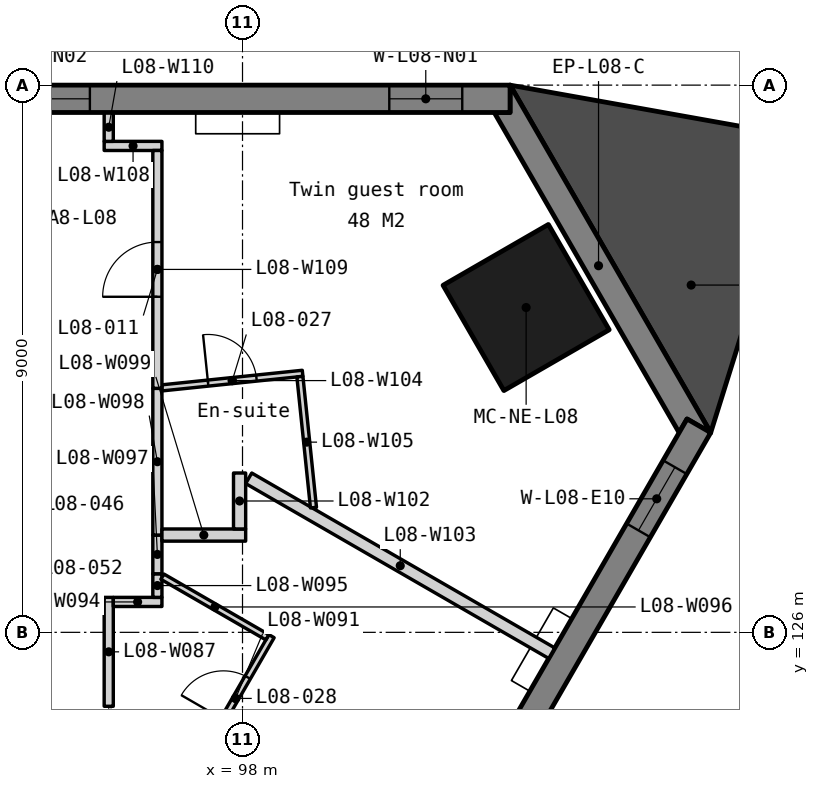
"""IFC4 building model, lengths in metres.
Left out: names, types, materials, properties, quantities, classifications, styles, units other than length and angle.
Written with IfcOpenShell. Run it as: python <this file> out.ifc"""

import sys

from ifc_helpers import new_model, si_unit, direction, frame, frame_2d, origin, origin_2d, place, context, subcontext, project, spatial, polyline, rectangle, outline, extrude, element, fill, save


model = new_model("IFC4")
c1 = context("Model", 3, precision=1e-05, world=origin(), true_north=direction((0.0, 1.0)))
c2 = subcontext(c1, "Body", "Model", "MODEL_VIEW")
j1 = project(units=[si_unit("LENGTHUNIT", "METRE"), si_unit("PLANEANGLEUNIT", "RADIAN")], contexts=[c1])
p1 = place(None, origin())
s1 = spatial("IfcSite", under=j1, at=p1, CompositionType="ELEMENT")
p2 = place(p1, origin())
s2 = spatial("IfcBuilding", under=s1, at=p2, CompositionType="ELEMENT")
p3 = place(p2, frame((0.0, 0.0, 42.0)))
s3 = spatial("IfcBuildingStorey", under=s2, at=p3, CompositionType="ELEMENT", Elevation=42.0)
p4 = place(p3, frame((102.664, 131.342, 0.0), z_axis=(0.0, 0.0, 1.0), x_axis=(-0.5, 0.866025403784, 0.0)))
e1 = element("IfcColumn", 1, at=p4, inside=s3, PredefinedType="COLUMN", context=c2, shape_type="SweptSolid", body=[
    extrude(rectangle(XDim=2.0, YDim=2.0, at=origin_2d()), origin(), (0.0, 0.0, 1.0), 3.5),
])
p5 = place(p3, frame((0.0, 0.0, -0.15)))
e2 = element("IfcWall", 2, at=p5, inside=s3, PredefinedType="SOLIDWALL", context=c2, shape_type="SweptSolid", body=[
    extrude(outline(polyline([(105.7, 129.284), (105.31, 129.509), (105.18, 129.284), (102.14, 134.55), (102.4, 134.55), (102.4, 135.0), (105.7, 129.284)])), origin(), (0.0, 0.0, 1.0), 3.5),
])
p6 = place(p3, frame((102.4, 134.775, -0.15), z_axis=(0.0, 0.0, 1.0), x_axis=(-1.0, 0.0, 0.0)))
e3 = element("IfcWall", 3, at=p6, inside=s3, PredefinedType="SOLIDWALL", context=c2, shape_type="SweptSolid", body=[
    extrude(outline(polyline([(44.8, 0.0), (44.8, 3.5), (0.0, 3.5), (0.0, 0.0), (44.8, 0.0)])), frame((0.0, 0.225, 0.0), z_axis=(0.0, -1.0, 0.0), x_axis=(1.0, 0.0, 0.0)), (0.0, 0.0, 1.0), 0.45),
])
p7 = place(p6, frame((0.786, 0.0, 1.05)))
e4 = element("IfcOpeningElement", 4, at=p7, cuts=e3, PredefinedType="OPENING", context=c2, shape_type="SweptSolid", body=[
    extrude(rectangle(XDim=1.2, YDim=1.5, at=frame_2d((0.6, 0.75))), frame((0.0, 0.235, 0.0), z_axis=(0.0, -1.0, 0.0), x_axis=(1.0, 0.0, 0.0)), (0.0, 0.0, 1.0), 0.47),
])
p8 = place(p6, frame((6.91, 0.0, 1.05)))
e5 = element("IfcOpeningElement", 5, at=p8, cuts=e3, PredefinedType="OPENING", context=c2, shape_type="SweptSolid", body=[
    extrude(rectangle(XDim=1.8, YDim=1.5, at=frame_2d((0.9, 0.75))), frame((0.0, 0.235, 0.0), z_axis=(0.0, -1.0, 0.0), x_axis=(1.0, 0.0, 0.0)), (0.0, 0.0, 1.0), 0.47),
])
p9 = place(p6, frame((9.21, 0.0, 1.05)))
e6 = element("IfcOpeningElement", 6, at=p9, cuts=e3, PredefinedType="OPENING", context=c2, shape_type="SweptSolid", body=[
    extrude(rectangle(XDim=1.8, YDim=1.5, at=frame_2d((0.9, 0.75))), frame((0.0, 0.235, 0.0), z_axis=(0.0, -1.0, 0.0), x_axis=(1.0, 0.0, 0.0)), (0.0, 0.0, 1.0), 0.47),
])
p10 = place(p6, frame((15.87, 0.0, 1.05)))
e7 = element("IfcOpeningElement", 7, at=p10, cuts=e3, PredefinedType="OPENING", context=c2, shape_type="SweptSolid", body=[
    extrude(rectangle(XDim=1.8, YDim=1.5, at=frame_2d((0.9, 0.75))), frame((0.0, 0.235, 0.0), z_axis=(0.0, -1.0, 0.0), x_axis=(1.0, 0.0, 0.0)), (0.0, 0.0, 1.0), 0.47),
])
p11 = place(p6, frame((18.17, 0.0, 1.05)))
e8 = element("IfcOpeningElement", 8, at=p11, cuts=e3, PredefinedType="OPENING", context=c2, shape_type="SweptSolid", body=[
    extrude(rectangle(XDim=1.8, YDim=1.5, at=frame_2d((0.9, 0.75))), frame((0.0, 0.235, 0.0), z_axis=(0.0, -1.0, 0.0), x_axis=(1.0, 0.0, 0.0)), (0.0, 0.0, 1.0), 0.47),
])
p12 = place(p6, frame((24.83, 0.0, 1.05)))
e9 = element("IfcOpeningElement", 9, at=p12, cuts=e3, PredefinedType="OPENING", context=c2, shape_type="SweptSolid", body=[
    extrude(rectangle(XDim=1.8, YDim=1.5, at=frame_2d((0.9, 0.75))), frame((0.0, 0.235, 0.0), z_axis=(0.0, -1.0, 0.0), x_axis=(1.0, 0.0, 0.0)), (0.0, 0.0, 1.0), 0.47),
])
p13 = place(p6, frame((27.13, 0.0, 1.05)))
e10 = element("IfcOpeningElement", 10, at=p13, cuts=e3, PredefinedType="OPENING", context=c2, shape_type="SweptSolid", body=[
    extrude(rectangle(XDim=1.8, YDim=1.5, at=frame_2d((0.9, 0.75))), frame((0.0, 0.235, 0.0), z_axis=(0.0, -1.0, 0.0), x_axis=(1.0, 0.0, 0.0)), (0.0, 0.0, 1.0), 0.47),
])
p14 = place(p6, frame((33.79, 0.0, 1.05)))
e11 = element("IfcOpeningElement", 11, at=p14, cuts=e3, PredefinedType="OPENING", context=c2, shape_type="SweptSolid", body=[
    extrude(rectangle(XDim=1.8, YDim=1.5, at=frame_2d((0.9, 0.75))), frame((0.0, 0.235, 0.0), z_axis=(0.0, -1.0, 0.0), x_axis=(1.0, 0.0, 0.0)), (0.0, 0.0, 1.0), 0.47),
])
p15 = place(p6, frame((36.09, 0.0, 1.05)))
e12 = element("IfcOpeningElement", 12, at=p15, cuts=e3, PredefinedType="OPENING", context=c2, shape_type="SweptSolid", body=[
    extrude(rectangle(XDim=1.8, YDim=1.5, at=frame_2d((0.9, 0.75))), frame((0.0, 0.235, 0.0), z_axis=(0.0, -1.0, 0.0), x_axis=(1.0, 0.0, 0.0)), (0.0, 0.0, 1.0), 0.47),
])
p16 = place(p6, frame((42.814, 0.0, 1.05)))
e13 = element("IfcOpeningElement", 13, at=p16, cuts=e3, PredefinedType="OPENING", context=c2, shape_type="SweptSolid", body=[
    extrude(rectangle(XDim=1.2, YDim=1.5, at=frame_2d((0.6, 0.75))), frame((0.0, 0.235, 0.0), z_axis=(0.0, -1.0, 0.0), x_axis=(1.0, 0.0, 0.0)), (0.0, 0.0, 1.0), 0.47),
])
p17 = place(p3, frame((83.105, 90.599, -0.15), z_axis=(0.0, 0.0, 1.0), x_axis=(0.499999201451, 0.866025864826, 0.0)))
e14 = element("IfcWall", 14, at=p17, inside=s3, PredefinedType="SOLIDWALL", context=c2, shape_type="SweptSolid", body=[
    extrude(outline(polyline([(44.8, 0.0), (44.8, 3.5), (0.0, 3.5), (0.0, 0.0), (44.8, 0.0)])), frame((0.0, 0.225, 0.0), z_axis=(0.0, -1.0, 0.0), x_axis=(1.0, 0.0, 0.0)), (0.0, 0.0, 1.0), 0.45),
])
p18 = place(p17, frame((0.786, 0.0, 1.05)))
e15 = element("IfcOpeningElement", 15, at=p18, cuts=e14, PredefinedType="OPENING", context=c2, shape_type="SweptSolid", body=[
    extrude(rectangle(XDim=1.2, YDim=1.5, at=frame_2d((0.6, 0.75))), frame((0.0, 0.235, 0.0), z_axis=(0.0, -1.0, 0.0), x_axis=(1.0, 0.0, 0.0)), (0.0, 0.0, 1.0), 0.47),
])
p19 = place(p17, frame((6.91, 0.0, 1.05)))
e16 = element("IfcOpeningElement", 16, at=p19, cuts=e14, PredefinedType="OPENING", context=c2, shape_type="SweptSolid", body=[
    extrude(rectangle(XDim=1.8, YDim=1.5, at=frame_2d((0.9, 0.75))), frame((0.0, 0.235, 0.0), z_axis=(0.0, -1.0, 0.0), x_axis=(1.0, 0.0, 0.0)), (0.0, 0.0, 1.0), 0.47),
])
p20 = place(p17, frame((9.21, 0.0, 1.05)))
e17 = element("IfcOpeningElement", 17, at=p20, cuts=e14, PredefinedType="OPENING", context=c2, shape_type="SweptSolid", body=[
    extrude(rectangle(XDim=1.8, YDim=1.5, at=frame_2d((0.9, 0.75))), frame((0.0, 0.235, 0.0), z_axis=(0.0, -1.0, 0.0), x_axis=(1.0, 0.0, 0.0)), (0.0, 0.0, 1.0), 0.47),
])
p21 = place(p17, frame((15.87, 0.0, 1.05)))
e18 = element("IfcOpeningElement", 18, at=p21, cuts=e14, PredefinedType="OPENING", context=c2, shape_type="SweptSolid", body=[
    extrude(rectangle(XDim=1.8, YDim=1.5, at=frame_2d((0.9, 0.75))), frame((0.0, 0.235, 0.0), z_axis=(0.0, -1.0, 0.0), x_axis=(1.0, 0.0, 0.0)), (0.0, 0.0, 1.0), 0.47),
])
p22 = place(p17, frame((18.17, 0.0, 1.05)))
e19 = element("IfcOpeningElement", 19, at=p22, cuts=e14, PredefinedType="OPENING", context=c2, shape_type="SweptSolid", body=[
    extrude(rectangle(XDim=1.8, YDim=1.5, at=frame_2d((0.9, 0.75))), frame((0.0, 0.235, 0.0), z_axis=(0.0, -1.0, 0.0), x_axis=(1.0, 0.0, 0.0)), (0.0, 0.0, 1.0), 0.47),
])
p23 = place(p17, frame((24.83, 0.0, 1.05)))
e20 = element("IfcOpeningElement", 20, at=p23, cuts=e14, PredefinedType="OPENING", context=c2, shape_type="SweptSolid", body=[
    extrude(rectangle(XDim=1.8, YDim=1.5, at=frame_2d((0.9, 0.75))), frame((0.0, 0.235, 0.0), z_axis=(0.0, -1.0, 0.0), x_axis=(1.0, 0.0, 0.0)), (0.0, 0.0, 1.0), 0.47),
])
p24 = place(p17, frame((27.13, 0.0, 1.05)))
e21 = element("IfcOpeningElement", 21, at=p24, cuts=e14, PredefinedType="OPENING", context=c2, shape_type="SweptSolid", body=[
    extrude(rectangle(XDim=1.8, YDim=1.5, at=frame_2d((0.9, 0.75))), frame((0.0, 0.235, 0.0), z_axis=(0.0, -1.0, 0.0), x_axis=(1.0, 0.0, 0.0)), (0.0, 0.0, 1.0), 0.47),
])
p25 = place(p17, frame((33.79, 0.0, 1.05)))
e22 = element("IfcOpeningElement", 22, at=p25, cuts=e14, PredefinedType="OPENING", context=c2, shape_type="SweptSolid", body=[
    extrude(rectangle(XDim=1.8, YDim=1.5, at=frame_2d((0.9, 0.75))), frame((0.0, 0.235, 0.0), z_axis=(0.0, -1.0, 0.0), x_axis=(1.0, 0.0, 0.0)), (0.0, 0.0, 1.0), 0.47),
])
p26 = place(p17, frame((36.09, 0.0, 1.05)))
e23 = element("IfcOpeningElement", 23, at=p26, cuts=e14, PredefinedType="OPENING", context=c2, shape_type="SweptSolid", body=[
    extrude(rectangle(XDim=1.8, YDim=1.5, at=frame_2d((0.9, 0.75))), frame((0.0, 0.235, 0.0), z_axis=(0.0, -1.0, 0.0), x_axis=(1.0, 0.0, 0.0)), (0.0, 0.0, 1.0), 0.47),
])
p27 = place(p17, frame((42.814, 0.0, 1.05)))
e24 = element("IfcOpeningElement", 24, at=p27, cuts=e14, PredefinedType="OPENING", context=c2, shape_type="SweptSolid", body=[
    extrude(rectangle(XDim=1.2, YDim=1.5, at=frame_2d((0.6, 0.75))), frame((0.0, 0.235, 0.0), z_axis=(0.0, -1.0, 0.0), x_axis=(1.0, 0.0, 0.0)), (0.0, 0.0, 1.0), 0.47),
])
p28 = place(p3, frame((0.0, 0.0, -0.15)))
e25 = element("IfcWall", 25, at=p28, inside=s3, PredefinedType="SOLIDWALL", context=c2, shape_type="SweptSolid", body=[
    extrude(outline(polyline([(105.7, 129.284), (107.218, 134.139), (102.4, 135.0), (105.7, 129.284)])), origin(), (0.0, 0.0, 1.0), 3.5),
])
p29 = place(p3, frame((95.8, 124.784, 0.0), z_axis=(0.0, 0.0, 1.0), x_axis=(0.0, 1.0, 0.0)))
e26 = element("IfcWall", 26, at=p29, inside=s3, PredefinedType="PARTITIONING", context=c2, shape_type="SweptSolid", body=[
    extrude(rectangle(XDim=1.791, YDim=0.15, at=frame_2d((0.896, 0.0))), origin(), (0.0, 0.0, 1.0), 3.35),
])
p30 = place(p3, frame((97.295, 123.889, 0.0), z_axis=(0.0, 0.0, 1.0), x_axis=(0.500002418582, 0.866024007411, 0.0)))
e27 = element("IfcWall", 27, at=p30, inside=s3, PredefinedType="PARTITIONING", context=c2, shape_type="SweptSolid", body=[
    extrude(rectangle(XDim=2.365, YDim=0.1, at=frame_2d((1.183, 0.0))), origin(), (0.0, 0.0, 1.0), 3.35),
])
p31 = place(p30, frame((0.782, 0.0, 0.0)))
e28 = element("IfcOpeningElement", 28, at=p31, cuts=e27, PredefinedType="OPENING", context=c2, shape_type="SweptSolid", body=[
    extrude(rectangle(XDim=0.8, YDim=2.1, at=frame_2d((0.4, 1.05))), frame((0.0, 0.06, 0.0), z_axis=(0.0, -1.0, 0.0), x_axis=(1.0, 0.0, 0.0)), (0.0, 0.0, 1.0), 0.12),
])
p32 = place(p3, frame((95.875, 126.5, 0.0), z_axis=(0.0, 0.0, 1.0), x_axis=(1.0, 0.0, 0.0)))
e29 = element("IfcWall", 29, at=p32, inside=s3, PredefinedType="PARTITIONING", context=c2, shape_type="SweptSolid", body=[
    extrude(rectangle(XDim=0.8, YDim=0.15, at=frame_2d((0.4, 0.0))), origin(), (0.0, 0.0, 1.0), 3.35),
])
p33 = place(p3, frame((96.6, 126.575, 0.0), z_axis=(0.0, 0.0, 1.0), x_axis=(0.0, 1.0, 0.0)))
e30 = element("IfcWall", 30, at=p33, inside=s3, PredefinedType="PARTITIONING", context=c2, shape_type="SweptSolid", body=[
    extrude(rectangle(XDim=0.388, YDim=0.15, at=frame_2d((0.194, 0.0))), origin(), (0.0, 0.0, 1.0), 3.35),
])
p34 = place(p3, frame((96.682, 126.916, 0.0), z_axis=(0.0, 0.0, 1.0), x_axis=(0.866026522829, -0.499998061752, 0.0)))
e31 = element("IfcWall", 31, at=p34, inside=s3, PredefinedType="PARTITIONING", context=c2, shape_type="SweptSolid", body=[
    extrude(rectangle(XDim=1.994, YDim=0.1, at=frame_2d((0.997, 0.0))), origin(), (0.0, 0.0, 1.0), 3.35),
])
p35 = place(p3, frame((96.6, 126.963, 0.0), z_axis=(0.0, 0.0, 1.0), x_axis=(0.0, 1.0, 0.0)))
e32 = element("IfcWall", 32, at=p35, inside=s3, PredefinedType="PARTITIONING", context=c2, shape_type="SweptSolid", body=[
    extrude(rectangle(XDim=0.637, YDim=0.15, at=frame_2d((0.318, 0.0))), origin(), (0.0, 0.0, 1.0), 3.35),
])
p36 = place(p3, frame((96.6, 127.6, 0.0), z_axis=(0.0, 0.0, 1.0), x_axis=(0.0, 1.0, 0.0)))
e33 = element("IfcWall", 33, at=p36, inside=s3, PredefinedType="PARTITIONING", context=c2, shape_type="SweptSolid", body=[
    extrude(rectangle(XDim=2.413, YDim=0.15, at=frame_2d((1.207, 0.0))), origin(), (0.0, 0.0, 1.0), 3.35),
])
p37 = place(p3, frame((96.675, 127.6, 0.0), z_axis=(0.0, 0.0, 1.0), x_axis=(1.0, 0.0, 0.0)))
e34 = element("IfcWall", 34, at=p37, inside=s3, PredefinedType="PARTITIONING", context=c2, shape_type="SweptSolid", body=[
    extrude(rectangle(XDim=1.377, YDim=0.2, at=frame_2d((0.688, 0.0))), origin(), (0.0, 0.0, 1.0), 2.938),
])
p38 = place(p3, frame((97.952, 127.7, 0.0), z_axis=(0.0, 0.0, 1.0), x_axis=(0.0, 1.0, 0.0)))
e35 = element("IfcWall", 35, at=p38, inside=s3, PredefinedType="PARTITIONING", context=c2, shape_type="SweptSolid", body=[
    extrude(rectangle(XDim=0.921, YDim=0.2, at=frame_2d((0.46, 0.0))), origin(), (0.0, 0.0, 1.0), 3.35),
])
p39 = place(p3, frame((98.102, 128.534, 0.0), z_axis=(0.0, 0.0, 1.0), x_axis=(0.866083868743, -0.499898722045, 0.0)))
e36 = element("IfcWall", 36, at=p39, inside=s3, PredefinedType="PARTITIONING", context=c2, shape_type="SweptSolid", body=[
    extrude(rectangle(XDim=5.755, YDim=0.2, at=frame_2d((2.877, 0.0))), origin(), (0.0, 0.0, 1.0), 3.35),
])
p40 = place(p3, frame((96.675, 130.021, 0.0), z_axis=(0.0, 0.0, 1.0), x_axis=(0.994663603819, 0.103171290762, 0.0)))
e37 = element("IfcWall", 37, at=p40, inside=s3, PredefinedType="PARTITIONING", context=c2, shape_type="SweptSolid", body=[
    extrude(rectangle(XDim=2.326, YDim=0.1, at=frame_2d((1.163, 0.0))), origin(), (0.0, 0.0, 1.0), 3.35),
])
p41 = place(p40, frame((0.763, 0.0, 0.0)))
e38 = element("IfcOpeningElement", 38, at=p41, cuts=e37, PredefinedType="OPENING", context=c2, shape_type="SweptSolid", body=[
    extrude(rectangle(XDim=0.8, YDim=2.1, at=frame_2d((0.4, 1.05))), frame((0.0, 0.06, 0.0), z_axis=(0.0, -1.0, 0.0), x_axis=(1.0, 0.0, 0.0)), (0.0, 0.0, 1.0), 0.12),
])
p42 = place(p3, frame((98.944, 130.206, 0.0), z_axis=(0.0, 0.0, 1.0), x_axis=(0.103118312291, -0.994669097575, 0.0)))
e39 = element("IfcWall", 39, at=p42, inside=s3, PredefinedType="PARTITIONING", context=c2, shape_type="SweptSolid", body=[
    extrude(rectangle(XDim=2.166, YDim=0.1, at=frame_2d((1.083, 0.0))), origin(), (0.0, 0.0, 1.0), 3.35),
])
p43 = place(p3, frame((95.725, 134.0, 0.0), z_axis=(0.0, 0.0, 1.0), x_axis=(1.0, 0.0, 0.0)))
e40 = element("IfcWall", 40, at=p43, inside=s3, PredefinedType="PARTITIONING", context=c2, shape_type="SweptSolid", body=[
    extrude(rectangle(XDim=0.95, YDim=0.15, at=frame_2d((0.475, 0.0))), origin(), (0.0, 0.0, 1.0), 2.887),
])
p44 = place(p3, frame((96.6, 130.013, 0.0), z_axis=(0.0, 0.0, 1.0), x_axis=(0.0, 1.0, 0.0)))
e41 = element("IfcWall", 41, at=p44, inside=s3, PredefinedType="PARTITIONING", context=c2, shape_type="SweptSolid", body=[
    extrude(rectangle(XDim=3.912, YDim=0.15, at=frame_2d((1.956, 0.0))), origin(), (0.0, 0.0, 1.0), 3.35),
])
p45 = place(p44, frame((1.506, 0.0, 0.0)))
e42 = element("IfcOpeningElement", 42, at=p45, cuts=e41, PredefinedType="OPENING", context=c2, shape_type="SweptSolid", body=[
    extrude(rectangle(XDim=0.9, YDim=2.1, at=frame_2d((0.45, 1.05))), frame((0.0, 0.085, 0.0), z_axis=(0.0, -1.0, 0.0), x_axis=(1.0, 0.0, 0.0)), (0.0, 0.0, 1.0), 0.17),
])
p46 = place(p3, frame((95.8, 134.075, 0.0), z_axis=(0.0, 0.0, 1.0), x_axis=(0.0, 1.0, 0.0)))
e43 = element("IfcWall", 43, at=p46, inside=s3, PredefinedType="PARTITIONING", context=c2, shape_type="SweptSolid", body=[
    extrude(rectangle(XDim=0.465, YDim=0.15, at=frame_2d((0.232, 0.0))), origin(), (0.0, 0.0, 1.0), 3.35),
])
p47 = place(p7, origin())
e44 = element("IfcWindow", 44, at=p47, inside=s3, PartitioningType="SINGLE_PANEL", PredefinedType="WINDOW", context=c2, shape_type="SweptSolid", body=[
    extrude(rectangle(XDim=1.2, YDim=1.5, at=frame_2d((0.6, 0.75))), frame((0.0, 0.03, 0.0), z_axis=(0.0, -1.0, 0.0), x_axis=(1.0, 0.0, 0.0)), (0.0, 0.0, 1.0), 0.06),
])
fill(e4, e44)
p48 = place(p8, origin())
e45 = element("IfcWindow", 45, at=p48, inside=s3, PartitioningType="SINGLE_PANEL", PredefinedType="WINDOW", context=c2, shape_type="SweptSolid", body=[
    extrude(rectangle(XDim=1.8, YDim=1.5, at=frame_2d((0.9, 0.75))), frame((0.0, 0.03, 0.0), z_axis=(0.0, -1.0, 0.0), x_axis=(1.0, 0.0, 0.0)), (0.0, 0.0, 1.0), 0.06),
])
fill(e5, e45)
p49 = place(p27, origin())
e46 = element("IfcWindow", 46, at=p49, inside=s3, PartitioningType="SINGLE_PANEL", PredefinedType="WINDOW", context=c2, shape_type="SweptSolid", body=[
    extrude(rectangle(XDim=1.2, YDim=1.5, at=frame_2d((0.6, 0.75))), frame((0.0, 0.03, 0.0), z_axis=(0.0, -1.0, 0.0), x_axis=(1.0, 0.0, 0.0)), (0.0, 0.0, 1.0), 0.06),
])
fill(e24, e46)
p50 = place(p45, origin())
e47 = element("IfcDoor", 47, at=p50, inside=s3, OperationType="SINGLE_SWING_LEFT", PredefinedType="DOOR", context=c2, shape_type="SweptSolid", body=[
    extrude(rectangle(XDim=0.9, YDim=2.1, at=frame_2d((0.45, 1.05))), frame((0.0, 0.025, 0.0), z_axis=(0.0, -1.0, 0.0), x_axis=(1.0, 0.0, 0.0)), (0.0, 0.0, 1.0), 0.05),
])
fill(e42, e47)
p51 = place(p41, origin())
e48 = element("IfcDoor", 48, at=p51, inside=s3, OperationType="SINGLE_SWING_LEFT", PredefinedType="DOOR", context=c2, shape_type="SweptSolid", body=[
    extrude(rectangle(XDim=0.8, YDim=2.1, at=frame_2d((0.4, 1.05))), frame((0.0, 0.025, 0.0), z_axis=(0.0, -1.0, 0.0), x_axis=(1.0, 0.0, 0.0)), (0.0, 0.0, 1.0), 0.05),
])
fill(e38, e48)
p52 = place(p31, origin())
e49 = element("IfcDoor", 49, at=p52, inside=s3, OperationType="SINGLE_SWING_LEFT", PredefinedType="DOOR", context=c2, shape_type="SweptSolid", body=[
    extrude(rectangle(XDim=0.8, YDim=2.1, at=frame_2d((0.4, 1.05))), frame((0.0, 0.025, 0.0), z_axis=(0.0, -1.0, 0.0), x_axis=(1.0, 0.0, 0.0)), (0.0, 0.0, 1.0), 0.05),
])
fill(e28, e49)
save(model, sys.argv[1])
